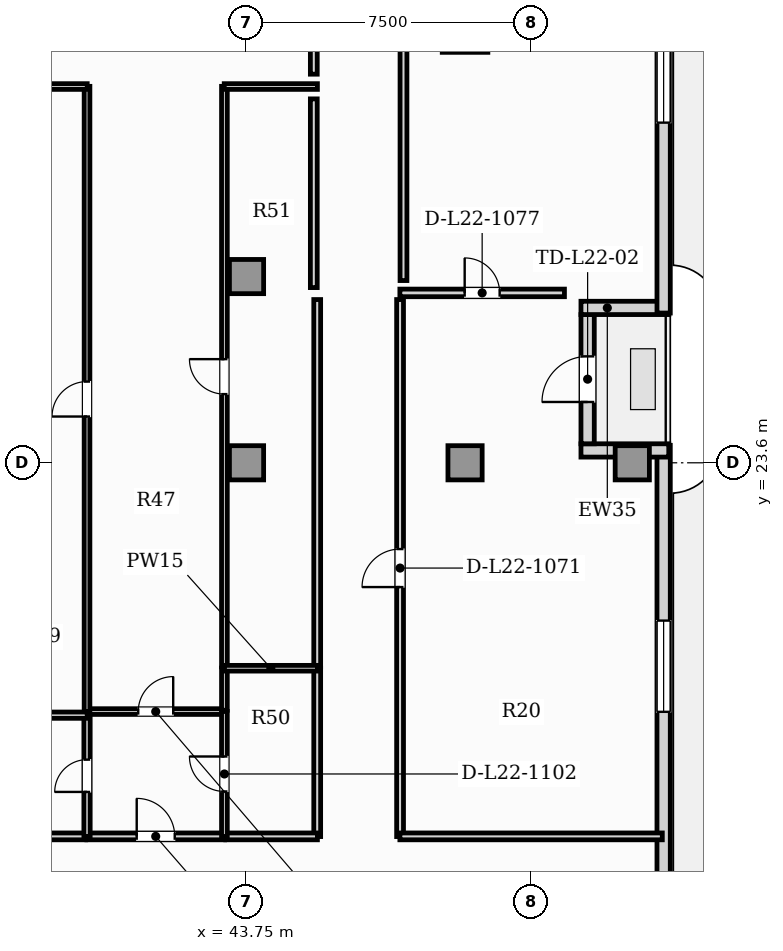
"""IFC4 building model, lengths in metres.
Left out: names, types, materials, properties, quantities, classifications, styles, units other than length and angle.
Written with IfcOpenShell. Run it as: python <this file> out.ifc"""

import sys

from ifc_helpers import new_model, si_unit, direction, frame, frame_2d, origin, origin_2d, place, context, subcontext, project, spatial, rectangle, hollow_rectangle, extrude, element, fill, save


model = new_model("IFC4")
c1 = context("Model", 3, precision=1e-05, world=origin(), true_north=direction((0.0, 1.0)))
c2 = subcontext(c1, "Body", "Model", "MODEL_VIEW")
j1 = project(units=[si_unit("LENGTHUNIT", "METRE"), si_unit("PLANEANGLEUNIT", "RADIAN")], contexts=[c1])
p1 = place(None, origin())
s1 = spatial("IfcSite", under=j1, at=p1, CompositionType="ELEMENT")
p2 = place(p1, origin())
s2 = spatial("IfcBuilding", under=s1, at=p2, CompositionType="ELEMENT")
p3 = place(p2, frame((0.0, 0.0, 92.6)))
s3 = spatial("IfcBuildingStorey", under=s2, at=p3, CompositionType="ELEMENT", Elevation=92.6)
p4 = place(p3, frame((49.5, 35.0, 0.0), z_axis=(0.0, 0.0, 1.0), x_axis=(1.0, 0.0, 0.0)))
e1 = element("IfcColumn", 1, at=p4, inside=s3, PredefinedType="USERDEFINED", context=c2, shape_type="SweptSolid", body=[
    extrude(hollow_rectangle(XDim=1.2, YDim=1.2, WallThickness=0.07, at=origin_2d()), origin(), (0.0, 0.0, 1.0), 3.85),
])
for number, where, z_axis, x_axis in (
    (2, (43.75, 23.6, 0.0), (0.0, 0.0, 1.0), (1.0, 0.0, 0.0)),
    (3, (49.5, 23.6, 0.0), (0.0, 0.0, 1.0), (1.0, 0.0, 0.0)),
    (4, (53.9, 23.6, 0.0), (0.0, 0.0, 1.0), (1.0, 0.0, 0.0)),
    (5, (43.75, 28.5, 0.0), (0.0, 0.0, 1.0), (1.0, 0.0, 0.0)),
):
    element("IfcColumn", number, at=place(p3, frame(where, z_axis=z_axis, x_axis=x_axis)), inside=s3, PredefinedType="COLUMN", context=c2, shape_type="SweptSolid", body=[
        extrude(rectangle(XDim=0.9, YDim=0.9, at=origin_2d()), origin(), (0.0, 0.0, 1.0), 3.85),
    ])
p5 = place(p3, frame((54.725, 3.24, 0.0), z_axis=(0.0, 0.0, 1.0), x_axis=(0.0, 1.0, 0.0)))
e6 = element("IfcWall", 6, at=p5, inside=s3, PredefinedType="SOLIDWALL", context=c2, shape_type="SweptSolid", body=[
    extrude(rectangle(XDim=20.82, YDim=0.35, at=frame_2d((10.41, 0.0))), origin(), (0.0, 0.0, 1.0), 3.6),
])
p6 = place(p5, frame((13.808, 0.0, 0.85)))
e7 = element("IfcOpeningElement", 7, at=p6, cuts=e6, PredefinedType="OPENING", context=c2, shape_type="SweptSolid", body=[
    extrude(rectangle(XDim=2.4, YDim=2.0, at=frame_2d((1.2, 1.0))), frame((0.0, 0.185, 0.0), z_axis=(0.0, -1.0, 0.0), x_axis=(1.0, 0.0, 0.0)), (0.0, 0.0, 1.0), 0.37),
])
p7 = place(p3, frame((54.86, 23.925, 0.0), z_axis=(0.0, 0.0, 1.0), x_axis=(-1.0, 0.0, 0.0)))
e8 = element("IfcWall", 8, at=p7, inside=s3, PredefinedType="SOLIDWALL", context=c2, shape_type="SweptSolid", body=[
    extrude(rectangle(XDim=2.31, YDim=0.35, at=frame_2d((1.155, 0.0))), origin(), (0.0, 0.0, 1.0), 3.055),
])
p8 = place(p3, frame((52.725, 24.1, 0.0), z_axis=(0.0, 0.0, 1.0), x_axis=(0.0, 1.0, 0.0)))
e9 = element("IfcWall", 9, at=p8, inside=s3, PredefinedType="SOLIDWALL", context=c2, shape_type="SweptSolid", body=[
    extrude(rectangle(XDim=3.4, YDim=0.35, at=frame_2d((1.7, 0.0))), origin(), (0.0, 0.0, 1.0), 3.6),
])
p9 = place(p8, frame((1.1, 0.0, 0.0)))
e10 = element("IfcOpeningElement", 10, at=p9, cuts=e9, PredefinedType="OPENING", context=c2, shape_type="SweptSolid", body=[
    extrude(rectangle(XDim=1.2, YDim=2.2, at=frame_2d((0.6, 1.1))), frame((0.0, 0.185, 0.0), z_axis=(0.0, -1.0, 0.0), x_axis=(1.0, 0.0, 0.0)), (0.0, 0.0, 1.0), 0.37),
])
p10 = place(p3, frame((52.55, 27.675, 0.0), z_axis=(0.0, 0.0, 1.0), x_axis=(1.0, 0.0, 0.0)))
e11 = element("IfcWall", 11, at=p10, inside=s3, PredefinedType="SOLIDWALL", context=c2, shape_type="SweptSolid", body=[
    extrude(rectangle(XDim=2.31, YDim=0.35, at=frame_2d((1.155, 0.0))), origin(), (0.0, 0.0, 1.0), 3.6),
])
p11 = place(p3, frame((54.725, 27.54, 0.0), z_axis=(0.0, 0.0, 1.0), x_axis=(0.0, 1.0, 0.0)))
e12 = element("IfcWall", 12, at=p11, inside=s3, PredefinedType="SOLIDWALL", context=c2, shape_type="SweptSolid", body=[
    extrude(rectangle(XDim=12.42, YDim=0.35, at=frame_2d((6.21, 0.0))), origin(), (0.0, 0.0, 1.0), 3.6),
])
p12 = place(p11, frame((5.01, 0.0, 0.85)))
e13 = element("IfcOpeningElement", 13, at=p12, cuts=e12, PredefinedType="OPENING", context=c2, shape_type="SweptSolid", body=[
    extrude(rectangle(XDim=2.4, YDim=2.0, at=frame_2d((1.2, 1.0))), frame((0.0, 0.185, 0.0), z_axis=(0.0, -1.0, 0.0), x_axis=(1.0, 0.0, 0.0)), (0.0, 0.0, 1.0), 0.37),
])
p13 = place(p3, frame((47.79, 13.765, 0.0), z_axis=(0.0, 0.0, 1.0), x_axis=(0.0, 1.0, 0.0)))
e14 = element("IfcWall", 14, at=p13, inside=s3, PredefinedType="PARTITIONING", context=c2, shape_type="SweptSolid", body=[
    extrude(rectangle(XDim=14.13, YDim=0.18, at=frame_2d((7.065, 0.0))), origin(), (0.0, 0.0, 1.0), 3.6),
])
p14 = place(p13, frame((6.565, 0.0, 0.0)))
e15 = element("IfcOpeningElement", 15, at=p14, cuts=e14, PredefinedType="OPENING", context=c2, shape_type="SweptSolid", body=[
    extrude(rectangle(XDim=1.0, YDim=2.15, at=frame_2d((0.5, 1.075))), frame((0.0, 0.1, 0.0), z_axis=(0.0, -1.0, 0.0), x_axis=(1.0, 0.0, 0.0)), (0.0, 0.0, 1.0), 0.2),
])
p15 = place(p3, frame((47.785, 13.77, 0.0), z_axis=(0.0, 0.0, 1.0), x_axis=(1.0, 0.0, 0.0)))
e16 = element("IfcWall", 16, at=p15, inside=s3, PredefinedType="PARTITIONING", context=c2, shape_type="SweptSolid", body=[
    extrude(rectangle(XDim=6.905, YDim=0.18, at=frame_2d((3.453, 0.0))), origin(), (0.0, 0.0, 1.0), 3.6),
])
p16 = place(p3, frame((39.548, 13.77, 0.0), z_axis=(0.0, 0.0, 1.0), x_axis=(1.0, 0.0, 0.0)))
e17 = element("IfcWall", 17, at=p16, inside=s3, PredefinedType="PARTITIONING", context=c2, shape_type="SweptSolid", body=[
    extrude(rectangle(XDim=3.625, YDim=0.18, at=frame_2d((1.812, 0.0))), origin(), (0.0, 0.0, 1.0), 3.6),
])
p17 = place(p16, frame((1.312, 0.0, 0.0)))
e18 = element("IfcOpeningElement", 18, at=p17, cuts=e17, PredefinedType="OPENING", context=c2, shape_type="SweptSolid", body=[
    extrude(rectangle(XDim=1.0, YDim=2.15, at=frame_2d((0.5, 1.075))), frame((0.0, 0.1, 0.0), z_axis=(0.0, -1.0, 0.0), x_axis=(1.0, 0.0, 0.0)), (0.0, 0.0, 1.0), 0.2),
])
p18 = place(p3, frame((37.215, 13.77, 0.0), z_axis=(0.0, 0.0, 1.0), x_axis=(1.0, 0.0, 0.0)))
e19 = element("IfcWall", 19, at=p18, inside=s3, PredefinedType="PARTITIONING", context=c2, shape_type="SweptSolid", body=[
    extrude(rectangle(XDim=2.303, YDim=0.18, at=frame_2d((1.152, 0.0))), origin(), (0.0, 0.0, 1.0), 3.6),
])
p19 = place(p3, frame((45.61, 13.765, 0.0), z_axis=(0.0, 0.0, 1.0), x_axis=(0.0, 1.0, 0.0)))
e20 = element("IfcWall", 20, at=p19, inside=s3, PredefinedType="PARTITIONING", context=c2, shape_type="SweptSolid", body=[
    extrude(rectangle(XDim=4.435, YDim=0.18, at=frame_2d((2.217, 0.0))), origin(), (0.0, 0.0, 1.0), 3.6),
])
p20 = place(p3, frame((43.203, 13.77, 0.0), z_axis=(0.0, 0.0, 1.0), x_axis=(1.0, 0.0, 0.0)))
e21 = element("IfcWall", 21, at=p20, inside=s3, PredefinedType="PARTITIONING", context=c2, shape_type="SweptSolid", body=[
    extrude(rectangle(XDim=2.412, YDim=0.18, at=frame_2d((1.206, 0.0))), origin(), (0.0, 0.0, 1.0), 3.6),
])
p21 = place(p3, frame((45.61, 18.229, 0.0), z_axis=(0.0, 0.0, 1.0), x_axis=(0.0, 1.0, 0.0)))
e22 = element("IfcWall", 22, at=p21, inside=s3, PredefinedType="PARTITIONING", context=c2, shape_type="SweptSolid", body=[
    extrude(rectangle(XDim=9.666, YDim=0.18, at=frame_2d((4.833, 0.0))), origin(), (0.0, 0.0, 1.0), 3.6),
])
p22 = place(p3, frame((47.785, 28.07, 0.0), z_axis=(0.0, 0.0, 1.0), x_axis=(1.0, 0.0, 0.0)))
e23 = element("IfcWall", 23, at=p22, inside=s3, PredefinedType="PARTITIONING", context=c2, shape_type="SweptSolid", body=[
    extrude(rectangle(XDim=4.33, YDim=0.2, at=frame_2d((2.165, 0.0))), origin(), (0.0, 0.0, 1.0), 3.6),
])
p23 = place(p22, frame((1.705, 0.0, 0.0)))
e24 = element("IfcOpeningElement", 24, at=p23, cuts=e23, PredefinedType="OPENING", context=c2, shape_type="SweptSolid", body=[
    extrude(rectangle(XDim=0.92, YDim=2.1, at=frame_2d((0.46, 1.05))), frame((0.0, 0.11, 0.0), z_axis=(0.0, -1.0, 0.0), x_axis=(1.0, 0.0, 0.0)), (0.0, 0.0, 1.0), 0.22),
])
p24 = place(p3, frame((39.548, 17.054, 0.0), z_axis=(0.0, 0.0, 1.0), x_axis=(1.0, 0.0, 0.0)))
e25 = element("IfcWall", 25, at=p24, inside=s3, PredefinedType="PARTITIONING", context=c2, shape_type="SweptSolid", body=[
    extrude(rectangle(XDim=3.625, YDim=0.15, at=frame_2d((1.812, 0.0))), origin(), (0.0, 0.0, 1.0), 3.6),
])
p25 = place(p24, frame((1.353, 0.0, 0.0)))
e26 = element("IfcOpeningElement", 26, at=p25, cuts=e25, PredefinedType="OPENING", context=c2, shape_type="SweptSolid", body=[
    extrude(rectangle(XDim=0.92, YDim=2.1, at=frame_2d((0.46, 1.05))), frame((0.0, 0.085, 0.0), z_axis=(0.0, -1.0, 0.0), x_axis=(1.0, 0.0, 0.0)), (0.0, 0.0, 1.0), 0.17),
])
p26 = place(p3, frame((39.553, 13.765, 0.0), z_axis=(0.0, 0.0, 1.0), x_axis=(0.0, 1.0, 0.0)))
e27 = element("IfcWall", 27, at=p26, inside=s3, PredefinedType="PLUMBINGWALL", context=c2, shape_type="SweptSolid", body=[
    extrude(rectangle(XDim=3.199, YDim=0.165, at=frame_2d((1.6, 0.0))), origin(), (0.0, 0.0, 1.0), 3.6),
])
p27 = place(p26, frame((1.175, 0.0, 0.0)))
e28 = element("IfcOpeningElement", 28, at=p27, cuts=e27, PredefinedType="OPENING", context=c2, shape_type="SweptSolid", body=[
    extrude(rectangle(XDim=0.85, YDim=2.1, at=frame_2d((0.425, 1.05))), frame((0.0, 0.093, 0.0), z_axis=(0.0, -1.0, 0.0), x_axis=(1.0, 0.0, 0.0)), (0.0, 0.0, 1.0), 0.185),
])
p28 = place(p3, frame((43.168, 13.765, 0.0), z_axis=(0.0, 0.0, 1.0), x_axis=(0.0, 1.0, 0.0)))
e29 = element("IfcWall", 29, at=p28, inside=s3, PredefinedType="PARTITIONING", context=c2, shape_type="SweptSolid", body=[
    extrude(rectangle(XDim=3.294, YDim=0.15, at=frame_2d((1.647, 0.0))), origin(), (0.0, 0.0, 1.0), 3.6),
])
p29 = place(p28, frame((1.187, 0.0, 0.0)))
e30 = element("IfcOpeningElement", 30, at=p29, cuts=e29, PredefinedType="OPENING", context=c2, shape_type="SweptSolid", body=[
    extrude(rectangle(XDim=0.92, YDim=2.1, at=frame_2d((0.46, 1.05))), frame((0.0, 0.085, 0.0), z_axis=(0.0, -1.0, 0.0), x_axis=(1.0, 0.0, 0.0)), (0.0, 0.0, 1.0), 0.17),
])
p30 = place(p3, frame((39.553, 17.049, 0.0), z_axis=(0.0, 0.0, 1.0), x_axis=(0.0, 1.0, 0.0)))
e31 = element("IfcWall", 31, at=p30, inside=s3, PredefinedType="PARTITIONING", context=c2, shape_type="SweptSolid", body=[
    extrude(rectangle(XDim=16.456, YDim=0.15, at=frame_2d((8.228, 0.0))), origin(), (0.0, 0.0, 1.0), 3.6),
])
p31 = place(p30, frame((7.768, 0.0, 0.0)))
e32 = element("IfcOpeningElement", 32, at=p31, cuts=e31, PredefinedType="OPENING", context=c2, shape_type="SweptSolid", body=[
    extrude(rectangle(XDim=0.92, YDim=2.1, at=frame_2d((0.46, 1.05))), frame((0.0, 0.085, 0.0), z_axis=(0.0, -1.0, 0.0), x_axis=(1.0, 0.0, 0.0)), (0.0, 0.0, 1.0), 0.17),
])
p32 = place(p3, frame((37.215, 33.5, 0.0), z_axis=(0.0, 0.0, 1.0), x_axis=(1.0, 0.0, 0.0)))
e33 = element("IfcWall", 33, at=p32, inside=s3, PredefinedType="PARTITIONING", context=c2, shape_type="SweptSolid", body=[
    extrude(rectangle(XDim=2.343, YDim=0.15, at=frame_2d((1.171, 0.0))), origin(), (0.0, 0.0, 1.0), 3.6),
])
p33 = place(p3, frame((43.168, 17.089, 0.0), z_axis=(0.0, 0.0, 1.0), x_axis=(0.0, 1.0, 0.0)))
e34 = element("IfcWall", 34, at=p33, inside=s3, PredefinedType="PARTITIONING", context=c2, shape_type="SweptSolid", body=[
    extrude(rectangle(XDim=1.11, YDim=0.15, at=frame_2d((0.555, 0.0))), origin(), (0.0, 0.0, 1.0), 3.6),
])
p34 = place(p3, frame((43.168, 18.229, 0.0), z_axis=(0.0, 0.0, 1.0), x_axis=(0.0, 1.0, 0.0)))
e35 = element("IfcWall", 35, at=p34, inside=s3, PredefinedType="PARTITIONING", context=c2, shape_type="SweptSolid", body=[
    extrude(rectangle(XDim=15.275, YDim=0.15, at=frame_2d((7.638, 0.0))), origin(), (0.0, 0.0, 1.0), 3.6),
])
p35 = place(p34, frame((7.178, 0.0, 0.0)))
e36 = element("IfcOpeningElement", 36, at=p35, cuts=e35, PredefinedType="OPENING", context=c2, shape_type="SweptSolid", body=[
    extrude(rectangle(XDim=0.92, YDim=2.1, at=frame_2d((0.46, 1.05))), frame((0.0, 0.085, 0.0), z_axis=(0.0, -1.0, 0.0), x_axis=(1.0, 0.0, 0.0)), (0.0, 0.0, 1.0), 0.17),
])
p36 = place(p3, frame((43.163, 33.5, 0.0), z_axis=(0.0, 0.0, 1.0), x_axis=(1.0, 0.0, 0.0)))
e37 = element("IfcWall", 37, at=p36, inside=s3, PredefinedType="PARTITIONING", context=c2, shape_type="SweptSolid", body=[
    extrude(rectangle(XDim=2.452, YDim=0.15, at=frame_2d((1.226, 0.0))), origin(), (0.0, 0.0, 1.0), 3.6),
])
p37 = place(p3, frame((37.175, 16.959, 0.0), z_axis=(0.0, 0.0, 1.0), x_axis=(1.0, 0.0, 0.0)))
e38 = element("IfcWall", 38, at=p37, inside=s3, PredefinedType="PLUMBINGWALL", context=c2, shape_type="SweptSolid", body=[
    extrude(rectangle(XDim=2.383, YDim=0.165, at=frame_2d((1.191, 0.0))), origin(), (0.0, 0.0, 1.0), 3.6),
])
p38 = place(p3, frame((43.163, 18.194, 0.0), z_axis=(0.0, 0.0, 1.0), x_axis=(1.0, 0.0, 0.0)))
e39 = element("IfcWall", 39, at=p38, inside=s3, PredefinedType="PARTITIONING", context=c2, shape_type="SweptSolid", body=[
    extrude(rectangle(XDim=2.452, YDim=0.15, at=frame_2d((1.226, 0.0))), origin(), (0.0, 0.0, 1.0), 3.6),
])
p39 = place(p3, frame((47.88, 28.395, 0.0), z_axis=(0.0, 0.0, 1.0), x_axis=(0.0, 1.0, 0.0)))
e40 = element("IfcWall", 40, at=p39, inside=s3, PredefinedType="PARTITIONING", context=c2, shape_type="SweptSolid", body=[
    extrude(rectangle(XDim=14.595, YDim=0.18, at=frame_2d((7.297, 0.0))), origin(), (0.0, 0.0, 1.0), 3.6),
])
p40 = place(p3, frame((45.52, 34.675, 0.0), z_axis=(0.0, 0.0, 1.0), x_axis=(0.0, -1.0, 0.0)))
e41 = element("IfcWall", 41, at=p40, inside=s3, PredefinedType="PARTITIONING", context=c2, shape_type="SweptSolid", body=[
    extrude(rectangle(XDim=0.85, YDim=0.18, at=frame_2d((0.425, 0.0))), origin(), (0.0, 0.0, 1.0), 3.6),
])
p41 = place(p3, frame((45.52, 33.175, 0.0), z_axis=(0.0, 0.0, 1.0), x_axis=(0.0, -1.0, 0.0)))
e42 = element("IfcWall", 42, at=p41, inside=s3, PredefinedType="PARTITIONING", context=c2, shape_type="SweptSolid", body=[
    extrude(rectangle(XDim=4.965, YDim=0.18, at=frame_2d((2.482, 0.0))), origin(), (0.0, 0.0, 1.0), 3.6),
])
p42 = place(p9, frame((1.2, 0.0, 0.0), z_axis=(0.0, 0.0, 1.0), x_axis=(-1.0, 0.0, 0.0)))
e43 = element("IfcDoor", 43, at=p42, inside=s3, OperationType="SINGLE_SWING_RIGHT", PredefinedType="DOOR", context=c2, shape_type="SweptSolid", body=[
    extrude(rectangle(XDim=1.2, YDim=2.2, at=frame_2d((0.6, 1.1))), frame((0.0, 0.025, 0.0), z_axis=(0.0, -1.0, 0.0), x_axis=(1.0, 0.0, 0.0)), (0.0, 0.0, 1.0), 0.05),
])
fill(e10, e43)
p43 = place(p6, origin())
e44 = element("IfcWindow", 44, at=p43, inside=s3, PartitioningType="SINGLE_PANEL", PredefinedType="WINDOW", context=c2, shape_type="SweptSolid", body=[
    extrude(rectangle(XDim=2.4, YDim=2.0, at=frame_2d((1.2, 1.0))), frame((0.0, 0.03, 0.0), z_axis=(0.0, -1.0, 0.0), x_axis=(1.0, 0.0, 0.0)), (0.0, 0.0, 1.0), 0.06),
])
fill(e7, e44)
p44 = place(p12, origin())
e45 = element("IfcWindow", 45, at=p44, inside=s3, PartitioningType="SINGLE_PANEL", PredefinedType="WINDOW", context=c2, shape_type="SweptSolid", body=[
    extrude(rectangle(XDim=2.4, YDim=2.0, at=frame_2d((1.2, 1.0))), frame((0.0, 0.03, 0.0), z_axis=(0.0, -1.0, 0.0), x_axis=(1.0, 0.0, 0.0)), (0.0, 0.0, 1.0), 0.06),
])
fill(e13, e45)
p45 = place(p14, origin())
e46 = element("IfcDoor", 46, at=p45, inside=s3, OperationType="SINGLE_SWING_LEFT", PredefinedType="DOOR", context=c2, shape_type="SweptSolid", body=[
    extrude(rectangle(XDim=1.0, YDim=2.15, at=frame_2d((0.5, 1.075))), frame((0.0, 0.025, 0.0), z_axis=(0.0, -1.0, 0.0), x_axis=(1.0, 0.0, 0.0)), (0.0, 0.0, 1.0), 0.05),
])
fill(e15, e46)
p46 = place(p17, origin())
e47 = element("IfcDoor", 47, at=p46, inside=s3, OperationType="SINGLE_SWING_LEFT", PredefinedType="DOOR", context=c2, shape_type="SweptSolid", body=[
    extrude(rectangle(XDim=1.0, YDim=2.15, at=frame_2d((0.5, 1.075))), frame((0.0, 0.025, 0.0), z_axis=(0.0, -1.0, 0.0), x_axis=(1.0, 0.0, 0.0)), (0.0, 0.0, 1.0), 0.05),
])
fill(e18, e47)
p47 = place(p23, origin())
e48 = element("IfcDoor", 48, at=p47, inside=s3, OperationType="SINGLE_SWING_LEFT", PredefinedType="DOOR", context=c2, shape_type="SweptSolid", body=[
    extrude(rectangle(XDim=0.92, YDim=2.1, at=frame_2d((0.46, 1.05))), frame((0.0, 0.025, 0.0), z_axis=(0.0, -1.0, 0.0), x_axis=(1.0, 0.0, 0.0)), (0.0, 0.0, 1.0), 0.05),
])
fill(e24, e48)
p48 = place(p25, origin())
e49 = element("IfcDoor", 49, at=p48, inside=s3, OperationType="SINGLE_SWING_RIGHT", PredefinedType="DOOR", context=c2, shape_type="SweptSolid", body=[
    extrude(rectangle(XDim=0.92, YDim=2.1, at=frame_2d((0.46, 1.05))), frame((0.0, 0.025, 0.0), z_axis=(0.0, -1.0, 0.0), x_axis=(1.0, 0.0, 0.0)), (0.0, 0.0, 1.0), 0.05),
])
fill(e26, e49)
p49 = place(p27, origin())
e50 = element("IfcDoor", 50, at=p49, inside=s3, OperationType="SINGLE_SWING_LEFT", PredefinedType="DOOR", context=c2, shape_type="SweptSolid", body=[
    extrude(rectangle(XDim=0.85, YDim=2.1, at=frame_2d((0.425, 1.05))), frame((0.0, 0.025, 0.0), z_axis=(0.0, -1.0, 0.0), x_axis=(1.0, 0.0, 0.0)), (0.0, 0.0, 1.0), 0.05),
])
fill(e28, e50)
p50 = place(p29, origin())
e51 = element("IfcDoor", 51, at=p50, inside=s3, OperationType="SINGLE_SWING_RIGHT", PredefinedType="DOOR", context=c2, shape_type="SweptSolid", body=[
    extrude(rectangle(XDim=0.92, YDim=2.1, at=frame_2d((0.46, 1.05))), frame((0.0, 0.025, 0.0), z_axis=(0.0, -1.0, 0.0), x_axis=(1.0, 0.0, 0.0)), (0.0, 0.0, 1.0), 0.05),
])
fill(e30, e51)
p51 = place(p31, origin())
e52 = element("IfcDoor", 52, at=p51, inside=s3, OperationType="SINGLE_SWING_LEFT", PredefinedType="DOOR", context=c2, shape_type="SweptSolid", body=[
    extrude(rectangle(XDim=0.92, YDim=2.1, at=frame_2d((0.46, 1.05))), frame((0.0, 0.025, 0.0), z_axis=(0.0, -1.0, 0.0), x_axis=(1.0, 0.0, 0.0)), (0.0, 0.0, 1.0), 0.05),
])
fill(e32, e52)
p52 = place(p35, origin())
e53 = element("IfcDoor", 53, at=p52, inside=s3, OperationType="SINGLE_SWING_RIGHT", PredefinedType="DOOR", context=c2, shape_type="SweptSolid", body=[
    extrude(rectangle(XDim=0.92, YDim=2.1, at=frame_2d((0.46, 1.05))), frame((0.0, 0.025, 0.0), z_axis=(0.0, -1.0, 0.0), x_axis=(1.0, 0.0, 0.0)), (0.0, 0.0, 1.0), 0.05),
])
fill(e36, e53)
save(model, sys.argv[1])
